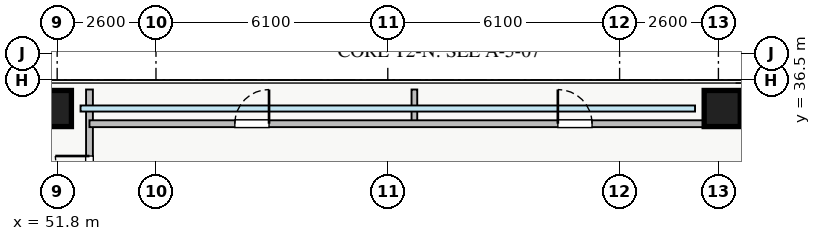
"""IFC4 building model, lengths in metres.
Left out: names, types, materials, properties, quantities, classifications, styles, units other than length and angle.
Written with IfcOpenShell. Run it as: python <this file> out.ifc"""

import sys

from ifc_helpers import new_model, si_unit, direction, frame, frame_2d, origin, origin_2d, place, context, subcontext, project, spatial, rectangle, extrude, source, transform, mapped, element, fill, save


model = new_model("IFC4")
c1 = context("Model", 3, precision=1e-05, world=origin(), true_north=direction((0.0, 1.0)))
c2 = subcontext(c1, "Body", "Model", "MODEL_VIEW")
j1 = project(units=[si_unit("LENGTHUNIT", "METRE"), si_unit("PLANEANGLEUNIT", "RADIAN")], contexts=[c1])
p1 = place(None, origin())
s1 = spatial("IfcSite", under=j1, at=p1, CompositionType="ELEMENT")
p2 = place(p1, origin())
s2 = spatial("IfcBuilding", under=s1, at=p2, CompositionType="ELEMENT")
p3 = place(p2, frame((0.0, 0.0, 29.5)))
s3 = spatial("IfcBuildingStorey", under=s2, at=p3, CompositionType="ELEMENT", Elevation=29.5)
m1 = source(origin(), c2, "Body", "SweptSolid", [
    extrude(rectangle(XDim=0.95, YDim=0.95, at=origin_2d()), origin(), (0.0, 0.0, 1.0), 3.25),
])
for number, where, z_axis, x_axis in (
    (1, (69.3, 35.75, 0.0), (0.0, 0.0, 1.0), (1.0, 0.0, 0.0)),
    (2, (51.7, 35.75, 0.0), (0.0, 0.0, 1.0), (1.0, 0.0, 0.0)),
):
    element("IfcColumn", number, at=place(p3, frame(where, z_axis=z_axis, x_axis=x_axis)), inside=s3, PredefinedType="COLUMN", context=c2, shape_type="MappedRepresentation", body=[
        mapped(m1, transform((0.0, 0.0, 0.0), x_axis=(1.0, 0.0, 0.0), y_axis=(0.0, 1.0, 0.0), z_axis=(0.0, 0.0, 1.0), scale=1.0)),
    ])
p4 = place(p3, frame((52.65, 9.75, 0.0), z_axis=(0.0, 0.0, 1.0), x_axis=(0.0, 1.0, 0.0)))
e3 = element("IfcWall", 3, at=p4, inside=s3, PredefinedType="PARTITIONING", context=c2, shape_type="SweptSolid", body=[
    extrude(rectangle(XDim=26.5, YDim=0.18, at=frame_2d((13.25, 0.0))), origin(), (0.0, 0.0, 1.0), 3.07),
])
p5 = place(p4, frame((23.85, 0.0, 0.0)))
e4 = element("IfcOpeningElement", 4, at=p5, cuts=e3, PredefinedType="OPENING", context=c2, shape_type="SweptSolid", body=[
    extrude(rectangle(XDim=0.9, YDim=2.05, at=frame_2d((0.45, 1.025))), frame((0.0, 0.1, 0.0), z_axis=(0.0, -1.0, 0.0), x_axis=(1.0, 0.0, 0.0)), (0.0, 0.0, 1.0), 0.2),
])
p6 = place(p4, frame((1.75, 0.0, 0.0)))
e5 = element("IfcOpeningElement", 5, at=p6, cuts=e3, PredefinedType="OPENING", context=c2, shape_type="SweptSolid", body=[
    extrude(rectangle(XDim=0.9, YDim=2.05, at=frame_2d((0.45, 1.025))), frame((0.0, 0.1, 0.0), z_axis=(0.0, -1.0, 0.0), x_axis=(1.0, 0.0, 0.0)), (0.0, 0.0, 1.0), 0.2),
])
p7 = place(p4, frame((5.145, 0.0, 0.0)))
e6 = element("IfcOpeningElement", 6, at=p7, cuts=e3, PredefinedType="OPENING", context=c2, shape_type="SweptSolid", body=[
    extrude(rectangle(XDim=1.0, YDim=2.05, at=frame_2d((0.5, 1.025))), frame((0.0, 0.1, 0.0), z_axis=(0.0, -1.0, 0.0), x_axis=(1.0, 0.0, 0.0)), (0.0, 0.0, 1.0), 0.2),
])
p8 = place(p4, frame((14.39, 0.0, 0.0)))
e7 = element("IfcOpeningElement", 7, at=p8, cuts=e3, PredefinedType="OPENING", context=c2, shape_type="SweptSolid", body=[
    extrude(rectangle(XDim=1.0, YDim=2.05, at=frame_2d((0.5, 1.025))), frame((0.0, 0.1, 0.0), z_axis=(0.0, -1.0, 0.0), x_axis=(1.0, 0.0, 0.0)), (0.0, 0.0, 1.0), 0.2),
])
for number, where, z_axis, x_axis in (
    (8, (61.2, 35.35, 0.0), (0.0, 0.0, 1.0), (0.0, 1.0, 0.0)),
    (9, (69.65, 35.35, 0.0), (0.0, 0.0, 1.0), (0.0, 1.0, 0.0)),
):
    element("IfcWall", number, at=place(p3, frame(where, z_axis=z_axis, x_axis=x_axis)), inside=s3, PredefinedType="PARTITIONING", context=c2, shape_type="SweptSolid", body=[
        extrude(rectangle(XDim=0.9, YDim=0.15, at=frame_2d((0.45, 0.0))), origin(), (0.0, 0.0, 1.0), 3.07),
    ])
p9 = place(p3, frame((52.65, 35.35, 0.0), z_axis=(0.0, 0.0, 1.0), x_axis=(1.0, 0.0, 0.0)))
e10 = element("IfcWall", 10, at=p9, inside=s3, PredefinedType="PARTITIONING", context=c2, shape_type="SweptSolid", body=[
    extrude(rectangle(XDim=17.0, YDim=0.18, at=frame_2d((8.5, 0.0))), origin(), (0.0, 0.0, 1.0), 3.07),
])
p10 = place(p9, frame((3.825, 0.0, 0.0)))
e11 = element("IfcOpeningElement", 11, at=p10, cuts=e10, PredefinedType="OPENING", context=c2, shape_type="SweptSolid", body=[
    extrude(rectangle(XDim=0.9, YDim=2.05, at=frame_2d((0.45, 1.025))), frame((0.0, 0.1, 0.0), z_axis=(0.0, -1.0, 0.0), x_axis=(1.0, 0.0, 0.0)), (0.0, 0.0, 1.0), 0.2),
])
p11 = place(p9, frame((12.325, 0.0, 0.0)))
e12 = element("IfcOpeningElement", 12, at=p11, cuts=e10, PredefinedType="OPENING", context=c2, shape_type="SweptSolid", body=[
    extrude(rectangle(XDim=0.9, YDim=2.05, at=frame_2d((0.45, 1.025))), frame((0.0, 0.1, 0.0), z_axis=(0.0, -1.0, 0.0), x_axis=(1.0, 0.0, 0.0)), (0.0, 0.0, 1.0), 0.2),
])
m2 = source(origin(), c2, "Body", "SweptSolid", [
    extrude(rectangle(XDim=0.9, YDim=2.05, at=frame_2d((0.45, 1.025))), frame((0.0, 0.025, 0.0), z_axis=(0.0, -1.0, 0.0), x_axis=(1.0, 0.0, 0.0)), (0.0, 0.0, 1.0), 0.05),
])
p12 = place(p5, origin())
e13 = element("IfcDoor", 13, at=p12, inside=s3, OperationType="SINGLE_SWING_RIGHT", PredefinedType="DOOR", context=c2, shape_type="MappedRepresentation", body=[
    mapped(m2, transform((0.0, 0.0, 0.0), x_axis=(1.0, 0.0, 0.0), y_axis=(0.0, 1.0, 0.0), z_axis=(0.0, 0.0, 1.0), scale=1.0)),
])
fill(e4, e13)
p13 = place(p10, origin())
e14 = element("IfcDoor", 14, at=p13, inside=s3, OperationType="SINGLE_SWING_RIGHT", PredefinedType="DOOR", context=c2, shape_type="MappedRepresentation", body=[
    mapped(m2, transform((0.0, 0.0, 0.0), x_axis=(1.0, 0.0, 0.0), y_axis=(0.0, 1.0, 0.0), z_axis=(0.0, 0.0, 1.0), scale=1.0)),
])
fill(e11, e14)
p14 = place(p11, origin())
e15 = element("IfcDoor", 15, at=p14, inside=s3, OperationType="SINGLE_SWING_LEFT", PredefinedType="DOOR", context=c2, shape_type="MappedRepresentation", body=[
    mapped(m2, transform((0.0, 0.0, 0.0), x_axis=(1.0, 0.0, 0.0), y_axis=(0.0, 1.0, 0.0), z_axis=(0.0, 0.0, 1.0), scale=1.0)),
])
fill(e12, e15)
save(model, sys.argv[1])
